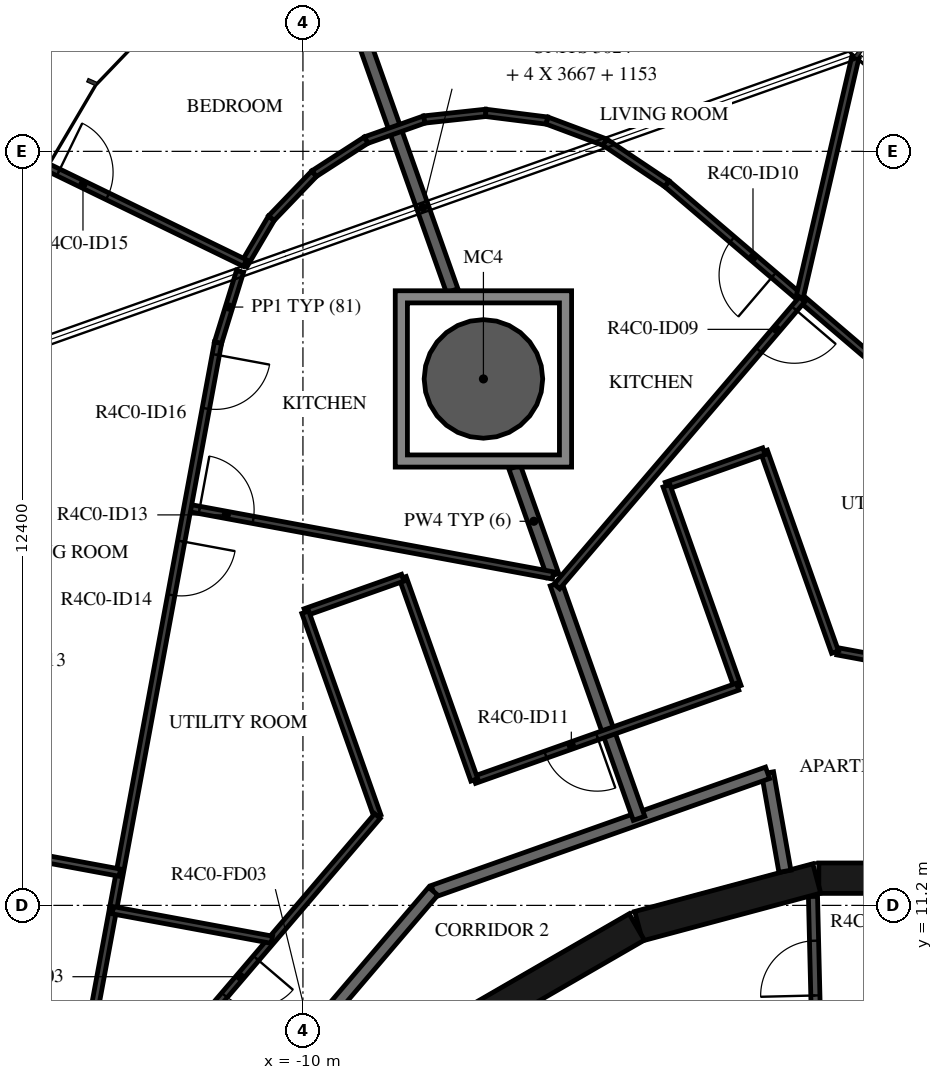
"""IFC4 building model, lengths in metres.
Left out: names, types, materials, properties, quantities, classifications, styles, units other than length and angle.
Written with IfcOpenShell. Run it as: python <this file> out.ifc"""

import sys

from ifc_helpers import new_model, si_unit, direction, frame, frame_2d, origin, origin_2d, place, context, subcontext, project, spatial, polyline, rectangle, hollow_circle, outline, extrude, element, fill, save


model = new_model("IFC4")
c1 = context("Model", 3, precision=1e-05, world=origin(), true_north=direction((0.0, 1.0)))
c2 = subcontext(c1, "Body", "Model", "MODEL_VIEW")
j1 = project(units=[si_unit("LENGTHUNIT", "METRE"), si_unit("PLANEANGLEUNIT", "RADIAN")], contexts=[c1])
p1 = place(None, origin())
s1 = spatial("IfcSite", under=j1, at=p1, CompositionType="ELEMENT")
p2 = place(p1, origin())
s2 = spatial("IfcBuilding", under=s1, at=p2, CompositionType="ELEMENT")
p3 = place(p2, frame((0.0, 0.0, 172.7)))
s3 = spatial("IfcBuildingStorey", under=s2, at=p3, CompositionType="ELEMENT", Elevation=172.7)
p4 = place(p3, frame((-7.032, 19.858, -0.38), z_axis=(0.0, 0.0, 1.0), x_axis=(1.0, 0.0, 0.0)))
e1 = element("IfcColumn", 1, at=p4, inside=s3, PredefinedType="COLUMN", context=c2, shape_type="SweptSolid", body=[
    extrude(hollow_circle(Radius=0.975, WallThickness=0.045, at=origin_2d()), origin(), (0.0, 0.0, 1.0), 3.5),
])
for number, where, z_axis, x_axis in (
    (2, (1.516, 11.647, 0.0), (0.0, 0.0, 1.0), (-1.0, 0.0, 0.0)),
    (3, (-1.55, 11.643, 0.0), (0.0, 0.0, 1.0), (-0.966, -0.259, 0.0)),
    (4, (-4.51, 10.845, 0.0), (0.0, 0.0, 1.0), (-0.866, -0.5, 0.0)),
):
    element("IfcWall", number, at=place(p3, frame(where, z_axis=z_axis, x_axis=x_axis)), inside=s3, PredefinedType="SHEAR", context=c2, shape_type="SweptSolid", body=[
        extrude(rectangle(XDim=3.033, YDim=0.5, at=frame_2d((1.516, 0.0))), origin(), (0.0, 0.0, 1.0), 3.12),
    ])
p5 = place(p3, frame((-1.555, 8.99, 0.0), z_axis=(0.0, 0.0, 1.0), x_axis=(-0.024125549686, 0.999708936567, 0.0)))
e5 = element("IfcWall", 5, at=p5, inside=s3, PredefinedType="PARTITIONING", context=c2, shape_type="SweptSolid", body=[
    extrude(rectangle(XDim=2.358, YDim=0.15, at=frame_2d((1.179, 0.0))), origin(), (0.0, 0.0, 1.0), 3.12),
])
p6 = place(p5, frame((0.729, 0.0, 0.0)))
e6 = element("IfcOpeningElement", 6, at=p6, cuts=e5, PredefinedType="OPENING", context=c2, shape_type="SweptSolid", body=[
    extrude(rectangle(XDim=0.9, YDim=2.1, at=frame_2d((0.45, 1.05))), frame((0.0, 0.085, 0.0), z_axis=(0.0, -1.0, 0.0), x_axis=(1.0, 0.0, 0.0)), (0.0, 0.0, 1.0), 0.17),
])
p7 = place(p3, frame((-2.074, 11.761, 0.0), z_axis=(0.0, 0.0, 1.0), x_axis=(-0.1736412798, 0.984808969267, 0.0)))
e7 = element("IfcWall", 7, at=p7, inside=s3, PredefinedType="STANDARD", context=c2, shape_type="SweptSolid", body=[
    extrude(rectangle(XDim=1.644, YDim=0.2, at=frame_2d((0.822, 0.0))), origin(), (0.0, 0.0, 1.0), 3.12),
])
p8 = place(p3, frame((-2.359, 13.38, 0.0), z_axis=(0.0, 0.0, 1.0), x_axis=(-0.942647529236, -0.333789807551, 0.0)))
e8 = element("IfcWall", 8, at=p8, inside=s3, PredefinedType="STANDARD", context=c2, shape_type="SweptSolid", body=[
    extrude(rectangle(XDim=5.833, YDim=0.2, at=frame_2d((2.917, 0.0))), origin(), (0.0, 0.0, 1.0), 3.12),
])
p9 = place(p3, frame((-7.858, 11.433, 0.0), z_axis=(0.0, 0.0, 1.0), x_axis=(-0.649440801937, -0.760412154545, 0.0)))
e9 = element("IfcWall", 9, at=p9, inside=s3, PredefinedType="STANDARD", context=c2, shape_type="SweptSolid", body=[
    extrude(rectangle(XDim=7.181, YDim=0.2, at=frame_2d((3.59, 0.0))), origin(), (0.0, 0.0, 1.0), 3.12),
])
p10 = place(p9, frame((2.6, 0.0, 0.0)))
e10 = element("IfcOpeningElement", 10, at=p10, cuts=e9, PredefinedType="OPENING", context=c2, shape_type="SweptSolid", body=[
    extrude(rectangle(XDim=1.0, YDim=2.1, at=frame_2d((0.5, 1.05))), frame((0.0, 0.11, 0.0), z_axis=(0.0, -1.0, 0.0), x_axis=(1.0, 0.0, 0.0)), (0.0, 0.0, 1.0), 0.22),
])
p11 = place(p3, frame((-5.839, 16.488, 0.0), z_axis=(0.0, 0.0, 1.0), x_axis=(0.333840515054, -0.942629572265, 0.0)))
e11 = element("IfcWall", 11, at=p11, inside=s3, PredefinedType="STANDARD", context=c2, shape_type="SweptSolid", body=[
    extrude(rectangle(XDim=4.092, YDim=0.2, at=frame_2d((2.046, 0.0))), origin(), (0.0, 0.0, 1.0), 3.12),
])
p12 = place(p3, frame((-9.684, 27.348, 0.0), z_axis=(0.0, 0.0, 1.0), x_axis=(0.333810465454, -0.942640214055, 0.0)))
e12 = element("IfcWall", 12, at=p12, inside=s3, PredefinedType="STANDARD", context=c2, shape_type="SweptSolid", body=[
    extrude(rectangle(XDim=6.407, YDim=0.2, at=frame_2d((3.204, 0.0))), origin(), (0.0, 0.0, 1.0), 3.12),
])
p13 = place(p3, frame((-6.518, 18.408, 0.0), z_axis=(0.0, 0.0, 1.0), x_axis=(0.333725210903, -0.942670400303, 0.0)))
e13 = element("IfcWall", 13, at=p13, inside=s3, PredefinedType="STANDARD", context=c2, shape_type="SweptSolid", body=[
    extrude(rectangle(XDim=1.89, YDim=0.2, at=frame_2d((0.945, 0.0))), origin(), (0.0, 0.0, 1.0), 3.12),
])
p14 = place(p3, frame((8.702, 12.206, 0.0), z_axis=(0.0, 0.0, 1.0), x_axis=(-0.760401313718, 0.649453494945, 0.0)))
e14 = element("IfcWall", 14, at=p14, inside=s3, PredefinedType="PARTITIONING", context=c2, shape_type="SweptSolid", body=[
    extrude(rectangle(XDim=16.724, YDim=0.12, at=frame_2d((8.362, 0.0))), origin(), (0.0, 0.0, 1.0), 3.12),
])
p15 = place(p14, frame((0.2, 0.0, 0.0)))
e15 = element("IfcOpeningElement", 15, at=p15, cuts=e14, PredefinedType="OPENING", context=c2, shape_type="SweptSolid", body=[
    extrude(rectangle(XDim=0.9, YDim=2.1, at=frame_2d((0.45, 1.05))), frame((0.0, 0.07, 0.0), z_axis=(0.0, -1.0, 0.0), x_axis=(1.0, 0.0, 0.0)), (0.0, 0.0, 1.0), 0.14),
])
p16 = place(p14, frame((8.02, 0.0, 0.0)))
e16 = element("IfcOpeningElement", 16, at=p16, cuts=e14, PredefinedType="OPENING", context=c2, shape_type="SweptSolid", body=[
    extrude(rectangle(XDim=0.9, YDim=2.1, at=frame_2d((0.45, 1.05))), frame((0.0, 0.07, 0.0), z_axis=(0.0, -1.0, 0.0), x_axis=(1.0, 0.0, 0.0)), (0.0, 0.0, 1.0), 0.14),
])
p17 = place(p14, frame((14.412, 0.0, 0.0)))
e17 = element("IfcOpeningElement", 17, at=p17, cuts=e14, PredefinedType="OPENING", context=c2, shape_type="SweptSolid", body=[
    extrude(rectangle(XDim=0.9, YDim=2.1, at=frame_2d((0.45, 1.05))), frame((0.0, 0.07, 0.0), z_axis=(0.0, -1.0, 0.0), x_axis=(1.0, 0.0, 0.0)), (0.0, 0.0, 1.0), 0.14),
])
p18 = place(p3, frame((6.641, 13.923, 0.0), z_axis=(0.0, 0.0, 1.0), x_axis=(-0.983250157272, 0.182261153912, 0.0)))
e18 = element("IfcWall", 18, at=p18, inside=s3, PredefinedType="PARTITIONING", context=c2, shape_type="SweptSolid", body=[
    extrude(rectangle(XDim=7.985, YDim=0.12, at=frame_2d((3.992, 0.0))), origin(), (0.0, 0.0, 1.0), 3.12),
])
p19 = place(p18, frame((1.4, 0.0, 0.0)))
e19 = element("IfcOpeningElement", 19, at=p19, cuts=e18, PredefinedType="OPENING", context=c2, shape_type="SweptSolid", body=[
    extrude(rectangle(XDim=0.8, YDim=2.1, at=frame_2d((0.4, 1.05))), frame((0.0, 0.07, 0.0), z_axis=(0.0, -1.0, 0.0), x_axis=(1.0, 0.0, 0.0)), (0.0, 0.0, 1.0), 0.14),
])
p20 = place(p18, frame((5.069, 0.0, 0.0)))
e20 = element("IfcOpeningElement", 20, at=p20, cuts=e18, PredefinedType="OPENING", context=c2, shape_type="SweptSolid", body=[
    extrude(rectangle(XDim=0.9, YDim=2.1, at=frame_2d((0.45, 1.05))), frame((0.0, 0.07, 0.0), z_axis=(0.0, -1.0, 0.0), x_axis=(1.0, 0.0, 0.0)), (0.0, 0.0, 1.0), 0.14),
])
p21 = place(p3, frame((-1.249, 15.364, 0.0), z_axis=(0.0, 0.0, 1.0), x_axis=(-0.333811035895, 0.942640012048, 0.0)))
e21 = element("IfcWall", 21, at=p21, inside=s3, PredefinedType="PARTITIONING", context=c2, shape_type="SweptSolid", body=[
    extrude(rectangle(XDim=3.505, YDim=0.12, at=frame_2d((1.752, 0.0))), origin(), (0.0, 0.0, 1.0), 3.12),
])
p22 = place(p3, frame((-2.419, 18.668, 0.0), z_axis=(0.0, 0.0, 1.0), x_axis=(-0.942661115325, -0.333751436931, 0.0)))
e22 = element("IfcWall", 22, at=p22, inside=s3, PredefinedType="PARTITIONING", context=c2, shape_type="SweptSolid", body=[
    extrude(rectangle(XDim=1.7, YDim=0.12, at=frame_2d((0.85, 0.0))), origin(), (0.0, 0.0, 1.0), 3.12),
])
p23 = place(p3, frame((-4.021, 18.101, 0.0), z_axis=(0.0, 0.0, 1.0), x_axis=(0.333811035895, -0.942640012048, 0.0)))
e23 = element("IfcWall", 23, at=p23, inside=s3, PredefinedType="PARTITIONING", context=c2, shape_type="SweptSolid", body=[
    extrude(rectangle(XDim=3.505, YDim=0.12, at=frame_2d((1.752, 0.0))), origin(), (0.0, 0.0, 1.0), 3.12),
])
p24 = place(p3, frame((-2.852, 14.797, 0.0), z_axis=(0.0, 0.0, 1.0), x_axis=(-0.942629664375, -0.333840254973, 0.0)))
e24 = element("IfcWall", 24, at=p24, inside=s3, PredefinedType="PARTITIONING", context=c2, shape_type="SweptSolid", body=[
    extrude(rectangle(XDim=4.593, YDim=0.12, at=frame_2d((2.297, 0.0))), origin(), (0.0, 0.0, 1.0), 3.12),
])
p25 = place(p24, frame((2.451, 0.0, 0.0)))
e25 = element("IfcOpeningElement", 25, at=p25, cuts=e24, PredefinedType="OPENING", context=c2, shape_type="SweptSolid", body=[
    extrude(rectangle(XDim=0.9, YDim=2.1, at=frame_2d((0.45, 1.05))), frame((0.0, 0.07, 0.0), z_axis=(0.0, -1.0, 0.0), x_axis=(1.0, 0.0, 0.0)), (0.0, 0.0, 1.0), 0.14),
])
p26 = place(p3, frame((-0.914, 25.153, 0.0), z_axis=(0.0, 0.0, 1.0), x_axis=(-0.226085850586, -0.974107380202, 0.0)))
e26 = element("IfcWall", 26, at=p26, inside=s3, PredefinedType="PARTITIONING", context=c2, shape_type="SweptSolid", body=[
    extrude(rectangle(XDim=4.056, YDim=0.12, at=frame_2d((2.028, 0.0))), origin(), (0.0, 0.0, 1.0), 3.12),
])
p27 = place(p3, frame((-1.79, 21.167, 0.0), z_axis=(0.0, 0.0, 1.0), x_axis=(-0.649456490412, -0.7603987553, 0.0)))
e27 = element("IfcWall", 27, at=p27, inside=s3, PredefinedType="PARTITIONING", context=c2, shape_type="SweptSolid", body=[
    extrude(rectangle(XDim=6.21, YDim=0.12, at=frame_2d((3.105, 0.0))), origin(), (0.0, 0.0, 1.0), 3.12),
])
p28 = place(p27, frame((0.2, 0.0, 0.0)))
e28 = element("IfcOpeningElement", 28, at=p28, cuts=e27, PredefinedType="OPENING", context=c2, shape_type="SweptSolid", body=[
    extrude(rectangle(XDim=0.9, YDim=2.1, at=frame_2d((0.45, 1.05))), frame((0.0, 0.07, 0.0), z_axis=(0.0, -1.0, 0.0), x_axis=(1.0, 0.0, 0.0)), (0.0, 0.0, 1.0), 0.14),
])
p29 = place(p3, frame((-8.961, 23.785, 0.0), z_axis=(0.0, 0.0, 1.0), x_axis=(0.942630376568, 0.333838244022, 0.0)))
e29 = element("IfcWall", 29, at=p29, inside=s3, PredefinedType="PARTITIONING", context=c2, shape_type="SweptSolid", body=[
    extrude(rectangle(XDim=1.016, YDim=0.12, at=frame_2d((0.508, 0.0))), origin(), (0.0, 0.0, 1.0), 3.12),
])
p30 = place(p3, frame((-8.004, 24.124, 0.0), z_axis=(0.0, 0.0, 1.0), x_axis=(0.994216064839, 0.107398400431, 0.0)))
e30 = element("IfcWall", 30, at=p30, inside=s3, PredefinedType="PARTITIONING", context=c2, shape_type="SweptSolid", body=[
    extrude(rectangle(XDim=1.016, YDim=0.12, at=frame_2d((0.508, 0.0))), origin(), (0.0, 0.0, 1.0), 3.12),
])
p31 = place(p3, frame((-6.994, 24.233, 0.0), z_axis=(0.0, 0.0, 1.0), x_axis=(0.992188875952, -0.124744676991, 0.0)))
e31 = element("IfcWall", 31, at=p31, inside=s3, PredefinedType="PARTITIONING", context=c2, shape_type="SweptSolid", body=[
    extrude(rectangle(XDim=1.016, YDim=0.12, at=frame_2d((0.508, 0.0))), origin(), (0.0, 0.0, 1.0), 3.12),
])
p32 = place(p3, frame((-5.986, 24.106, 0.0), z_axis=(0.0, 0.0, 1.0), x_axis=(0.936625084254, -0.350333343469, 0.0)))
e32 = element("IfcWall", 32, at=p32, inside=s3, PredefinedType="PARTITIONING", context=c2, shape_type="SweptSolid", body=[
    extrude(rectangle(XDim=1.016, YDim=0.12, at=frame_2d((0.508, 0.0))), origin(), (0.0, 0.0, 1.0), 3.12),
])
p33 = place(p3, frame((-5.034, 23.75, 0.0), z_axis=(0.0, 0.0, 1.0), x_axis=(0.83070096574, -0.556718874764, 0.0)))
e33 = element("IfcWall", 33, at=p33, inside=s3, PredefinedType="PARTITIONING", context=c2, shape_type="SweptSolid", body=[
    extrude(rectangle(XDim=1.227, YDim=0.12, at=frame_2d((0.614, 0.0))), origin(), (0.0, 0.0, 1.0), 3.12),
])
p34 = place(p3, frame((-7.181, 13.263, 0.0), z_axis=(0.0, 0.0, 1.0), x_axis=(-0.333822798183, 0.942635846663, 0.0)))
e34 = element("IfcWall", 34, at=p34, inside=s3, PredefinedType="PARTITIONING", context=c2, shape_type="SweptSolid", body=[
    extrude(rectangle(XDim=3.527, YDim=0.12, at=frame_2d((1.764, 0.0))), origin(), (0.0, 0.0, 1.0), 3.12),
])
p35 = place(p3, frame((-8.359, 16.588, 0.0), z_axis=(0.0, 0.0, 1.0), x_axis=(-0.942661115325, -0.333751436931, 0.0)))
e35 = element("IfcWall", 35, at=p35, inside=s3, PredefinedType="PARTITIONING", context=c2, shape_type="SweptSolid", body=[
    extrude(rectangle(XDim=1.7, YDim=0.12, at=frame_2d((0.85, 0.0))), origin(), (0.0, 0.0, 1.0), 3.12),
])
p36 = place(p3, frame((-9.961, 16.021, 0.0), z_axis=(0.0, 0.0, 1.0), x_axis=(0.333803930912, -0.94264252806, 0.0)))
e36 = element("IfcWall", 36, at=p36, inside=s3, PredefinedType="PARTITIONING", context=c2, shape_type="SweptSolid", body=[
    extrude(rectangle(XDim=3.556, YDim=0.12, at=frame_2d((1.778, 0.0))), origin(), (0.0, 0.0, 1.0), 3.12),
])
p37 = place(p3, frame((-8.774, 12.669, 0.0), z_axis=(0.0, 0.0, 1.0), x_axis=(-0.649446157105, -0.760407580855, 0.0)))
e37 = element("IfcWall", 37, at=p37, inside=s3, PredefinedType="PARTITIONING", context=c2, shape_type="SweptSolid", body=[
    extrude(rectangle(XDim=7.927, YDim=0.12, at=frame_2d((3.964, 0.0))), origin(), (0.0, 0.0, 1.0), 3.12),
])
p38 = place(p37, frame((3.074, 0.0, 0.0)))
e38 = element("IfcOpeningElement", 38, at=p38, cuts=e37, PredefinedType="OPENING", context=c2, shape_type="SweptSolid", body=[
    extrude(rectangle(XDim=0.8, YDim=2.1, at=frame_2d((0.4, 1.05))), frame((0.0, 0.07, 0.0), z_axis=(0.0, -1.0, 0.0), x_axis=(1.0, 0.0, 0.0)), (0.0, 0.0, 1.0), 0.14),
])
p39 = place(p3, frame((-13.955, 6.647, 0.0), z_axis=(0.0, 0.0, 1.0), x_axis=(0.182264522222, 0.983249532896, 0.0)))
e39 = element("IfcWall", 39, at=p39, inside=s3, PredefinedType="PARTITIONING", context=c2, shape_type="SweptSolid", body=[
    extrude(rectangle(XDim=4.589, YDim=0.12, at=frame_2d((2.294, 0.0))), origin(), (0.0, 0.0, 1.0), 3.12),
])
p40 = place(p3, frame((-10.974, 21.728, 0.0), z_axis=(0.0, 0.0, 1.0), x_axis=(0.507353148194, 0.861738233466, 0.0)))
e40 = element("IfcWall", 40, at=p40, inside=s3, PredefinedType="PARTITIONING", context=c2, shape_type="SweptSolid", body=[
    extrude(rectangle(XDim=0.897, YDim=0.12, at=frame_2d((0.448, 0.0))), origin(), (0.0, 0.0, 1.0), 3.12),
])
p41 = place(p3, frame((-10.519, 22.501, 0.0), z_axis=(0.0, 0.0, 1.0), x_axis=(0.69266189308, 0.721262436201, 0.0)))
e41 = element("IfcWall", 41, at=p41, inside=s3, PredefinedType="PARTITIONING", context=c2, shape_type="SweptSolid", body=[
    extrude(rectangle(XDim=1.016, YDim=0.12, at=frame_2d((0.508, 0.0))), origin(), (0.0, 0.0, 1.0), 3.12),
])
p42 = place(p3, frame((-9.815, 23.234, 0.0), z_axis=(0.0, 0.0, 1.0), x_axis=(0.840310772539, 0.542104976508, 0.0)))
e42 = element("IfcWall", 42, at=p42, inside=s3, PredefinedType="PARTITIONING", context=c2, shape_type="SweptSolid", body=[
    extrude(rectangle(XDim=1.016, YDim=0.12, at=frame_2d((0.508, 0.0))), origin(), (0.0, 0.0, 1.0), 3.12),
])
p43 = place(p3, frame((-14.202, 23.341, 0.0), z_axis=(0.0, 0.0, 1.0), x_axis=(0.899466404534, -0.436989916491, 0.0)))
e43 = element("IfcWall", 43, at=p43, inside=s3, PredefinedType="PARTITIONING", context=c2, shape_type="SweptSolid", body=[
    extrude(rectangle(XDim=3.611, YDim=0.12, at=frame_2d((1.806, 0.0))), origin(), (0.0, 0.0, 1.0), 3.12),
])
p44 = place(p43, frame((0.2, 0.0, 0.0)))
e44 = element("IfcOpeningElement", 44, at=p44, cuts=e43, PredefinedType="OPENING", context=c2, shape_type="SweptSolid", body=[
    extrude(rectangle(XDim=0.9, YDim=2.1, at=frame_2d((0.45, 1.05))), frame((0.0, 0.07, 0.0), z_axis=(0.0, -1.0, 0.0), x_axis=(1.0, 0.0, 0.0)), (0.0, 0.0, 1.0), 0.14),
])
p45 = place(p3, frame((-11.899, 17.74, 0.0), z_axis=(0.0, 0.0, 1.0), x_axis=(0.983254721409, -0.182236529889, 0.0)))
e45 = element("IfcWall", 45, at=p45, inside=s3, PredefinedType="PARTITIONING", context=c2, shape_type="SweptSolid", body=[
    extrude(rectangle(XDim=6.114, YDim=0.12, at=frame_2d((3.057, 0.0))), origin(), (0.0, 0.0, 1.0), 3.12),
])
p46 = place(p45, frame((0.2, 0.0, 0.0)))
e46 = element("IfcOpeningElement", 46, at=p46, cuts=e45, PredefinedType="OPENING", context=c2, shape_type="SweptSolid", body=[
    extrude(rectangle(XDim=0.9, YDim=2.1, at=frame_2d((0.45, 1.05))), frame((0.0, 0.07, 0.0), z_axis=(0.0, -1.0, 0.0), x_axis=(1.0, 0.0, 0.0)), (0.0, 0.0, 1.0), 0.14),
])
p47 = place(p3, frame((-11.034, 21.625, 0.0), z_axis=(0.0, 0.0, 1.0), x_axis=(-0.295260042089, -0.955416928647, 0.0)))
e47 = element("IfcWall", 47, at=p47, inside=s3, PredefinedType="PARTITIONING", context=c2, shape_type="SweptSolid", body=[
    extrude(rectangle(XDim=1.227, YDim=0.12, at=frame_2d((0.614, 0.0))), origin(), (0.0, 0.0, 1.0), 3.12),
])
p48 = place(p3, frame((-11.396, 20.453, 0.0), z_axis=(0.0, 0.0, 1.0), x_axis=(-0.182223370439, -0.983257160292, 0.0)))
e48 = element("IfcWall", 48, at=p48, inside=s3, PredefinedType="PARTITIONING", context=c2, shape_type="SweptSolid", body=[
    extrude(rectangle(XDim=9.452, YDim=0.12, at=frame_2d((4.726, 0.0))), origin(), (0.0, 0.0, 1.0), 3.12),
])
p49 = place(p48, frame((3.319, 0.0, 0.0)))
e49 = element("IfcOpeningElement", 49, at=p49, cuts=e48, PredefinedType="OPENING", context=c2, shape_type="SweptSolid", body=[
    extrude(rectangle(XDim=0.9, YDim=2.1, at=frame_2d((0.45, 1.05))), frame((0.0, 0.07, 0.0), z_axis=(0.0, -1.0, 0.0), x_axis=(1.0, 0.0, 0.0)), (0.0, 0.0, 1.0), 0.14),
])
p50 = place(p48, frame((0.2, 0.0, 0.0)))
e50 = element("IfcOpeningElement", 50, at=p50, cuts=e48, PredefinedType="OPENING", context=c2, shape_type="SweptSolid", body=[
    extrude(rectangle(XDim=0.9, YDim=2.1, at=frame_2d((0.45, 1.05))), frame((0.0, 0.07, 0.0), z_axis=(0.0, -1.0, 0.0), x_axis=(1.0, 0.0, 0.0)), (0.0, 0.0, 1.0), 0.14),
])
p51 = place(p3, frame((-13.126, 11.12, 0.0), z_axis=(0.0, 0.0, 1.0), x_axis=(0.983257646361, -0.182220747645, 0.0)))
e51 = element("IfcWall", 51, at=p51, inside=s3, PredefinedType="PARTITIONING", context=c2, shape_type="SweptSolid", body=[
    extrude(rectangle(XDim=2.659, YDim=0.12, at=frame_2d((1.33, 0.0))), origin(), (0.0, 0.0, 1.0), 3.12),
])
p52 = place(p3, frame((-16.552, 12.394, 0.0), z_axis=(0.0, 0.0, 1.0), x_axis=(0.983257712156, -0.182220392618, 0.0)))
e52 = element("IfcWall", 52, at=p52, inside=s3, PredefinedType="PARTITIONING", context=c2, shape_type="SweptSolid", body=[
    extrude(rectangle(XDim=3.6, YDim=0.12, at=frame_2d((1.8, 0.0))), origin(), (0.0, 0.0, 1.0), 2.73),
])
p53 = place(p3, origin())
e53 = element("IfcWall", 53, at=p53, inside=s3, PredefinedType="STANDARD", context=c2, shape_type="SweptSolid", body=[
    extrude(outline(polyline([(-5.582, 21.308), (-5.582, 18.408), (-8.482, 18.408), (-8.482, 21.308), (-5.582, 21.308)]), holes=[polyline([(-8.282, 18.608), (-5.782, 18.608), (-5.782, 21.108), (-8.282, 21.108), (-8.282, 18.608)])]), origin(), (0.0, 0.0, 1.0), 3.12),
])
p54 = place(p6, origin())
e54 = element("IfcDoor", 54, at=p54, inside=s3, OperationType="SINGLE_SWING_RIGHT", PredefinedType="DOOR", context=c2, shape_type="SweptSolid", body=[
    extrude(rectangle(XDim=0.9, YDim=2.1, at=frame_2d((0.45, 1.05))), frame((0.0, 0.025, 0.0), z_axis=(0.0, -1.0, 0.0), x_axis=(1.0, 0.0, 0.0)), (0.0, 0.0, 1.0), 0.05),
])
fill(e6, e54)
p55 = place(p28, origin())
e55 = element("IfcDoor", 55, at=p55, inside=s3, OperationType="SINGLE_SWING_RIGHT", PredefinedType="DOOR", context=c2, shape_type="SweptSolid", body=[
    extrude(rectangle(XDim=0.9, YDim=2.1, at=frame_2d((0.45, 1.05))), frame((0.0, 0.025, 0.0), z_axis=(0.0, -1.0, 0.0), x_axis=(1.0, 0.0, 0.0)), (0.0, 0.0, 1.0), 0.05),
])
fill(e28, e55)
p56 = place(p17, origin())
e56 = element("IfcDoor", 56, at=p56, inside=s3, OperationType="SINGLE_SWING_RIGHT", PredefinedType="DOOR", context=c2, shape_type="SweptSolid", body=[
    extrude(rectangle(XDim=0.9, YDim=2.1, at=frame_2d((0.45, 1.05))), frame((0.0, 0.025, 0.0), z_axis=(0.0, -1.0, 0.0), x_axis=(1.0, 0.0, 0.0)), (0.0, 0.0, 1.0), 0.05),
])
fill(e17, e56)
p57 = place(p25, origin())
e57 = element("IfcDoor", 57, at=p57, inside=s3, OperationType="SINGLE_SWING_LEFT", PredefinedType="DOOR", context=c2, shape_type="SweptSolid", body=[
    extrude(rectangle(XDim=0.9, YDim=2.1, at=frame_2d((0.45, 1.05))), frame((0.0, 0.025, 0.0), z_axis=(0.0, -1.0, 0.0), x_axis=(1.0, 0.0, 0.0)), (0.0, 0.0, 1.0), 0.05),
])
fill(e25, e57)
p58 = place(p38, origin())
e58 = element("IfcDoor", 58, at=p58, inside=s3, OperationType="SINGLE_SWING_LEFT", PredefinedType="DOOR", context=c2, shape_type="SweptSolid", body=[
    extrude(rectangle(XDim=0.8, YDim=2.1, at=frame_2d((0.4, 1.05))), frame((0.0, 0.025, 0.0), z_axis=(0.0, -1.0, 0.0), x_axis=(1.0, 0.0, 0.0)), (0.0, 0.0, 1.0), 0.05),
])
fill(e38, e58)
p59 = place(p46, origin())
e59 = element("IfcDoor", 59, at=p59, inside=s3, OperationType="SINGLE_SWING_LEFT", PredefinedType="DOOR", context=c2, shape_type="SweptSolid", body=[
    extrude(rectangle(XDim=0.9, YDim=2.1, at=frame_2d((0.45, 1.05))), frame((0.0, 0.025, 0.0), z_axis=(0.0, -1.0, 0.0), x_axis=(1.0, 0.0, 0.0)), (0.0, 0.0, 1.0), 0.05),
])
fill(e46, e59)
p60 = place(p49, origin())
e60 = element("IfcDoor", 60, at=p60, inside=s3, OperationType="SINGLE_SWING_LEFT", PredefinedType="DOOR", context=c2, shape_type="SweptSolid", body=[
    extrude(rectangle(XDim=0.9, YDim=2.1, at=frame_2d((0.45, 1.05))), frame((0.0, 0.025, 0.0), z_axis=(0.0, -1.0, 0.0), x_axis=(1.0, 0.0, 0.0)), (0.0, 0.0, 1.0), 0.05),
])
fill(e49, e60)
p61 = place(p44, origin())
e61 = element("IfcDoor", 61, at=p61, inside=s3, OperationType="SINGLE_SWING_LEFT", PredefinedType="DOOR", context=c2, shape_type="SweptSolid", body=[
    extrude(rectangle(XDim=0.9, YDim=2.1, at=frame_2d((0.45, 1.05))), frame((0.0, 0.025, 0.0), z_axis=(0.0, -1.0, 0.0), x_axis=(1.0, 0.0, 0.0)), (0.0, 0.0, 1.0), 0.05),
])
fill(e44, e61)
p62 = place(p50, origin())
e62 = element("IfcDoor", 62, at=p62, inside=s3, OperationType="SINGLE_SWING_RIGHT", PredefinedType="DOOR", context=c2, shape_type="SweptSolid", body=[
    extrude(rectangle(XDim=0.9, YDim=2.1, at=frame_2d((0.45, 1.05))), frame((0.0, 0.025, 0.0), z_axis=(0.0, -1.0, 0.0), x_axis=(1.0, 0.0, 0.0)), (0.0, 0.0, 1.0), 0.05),
])
fill(e50, e62)
save(model, sys.argv[1])
